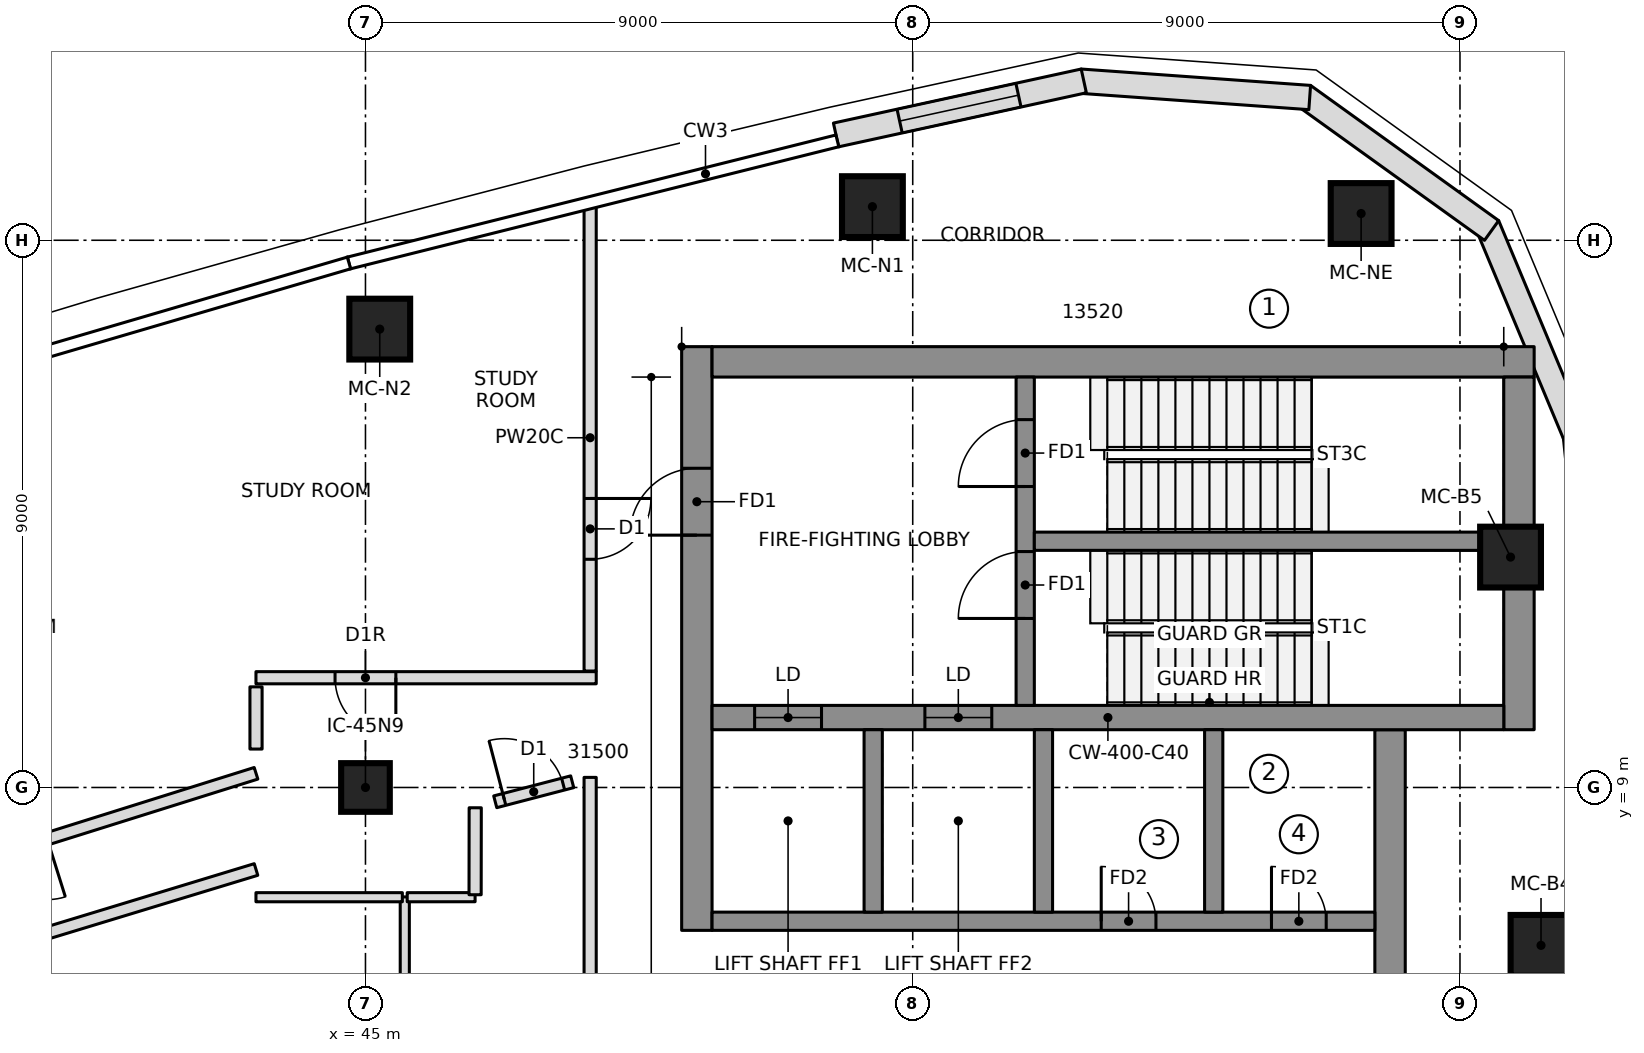
"""IFC4 building model, lengths in metres.
Left out: names, types, materials, properties, quantities, classifications, styles, units other than length and angle.
Written with IfcOpenShell. Run it as: python <this file> out.ifc"""

import sys

from ifc_helpers import new_model, si_unit, direction, frame, frame_2d, origin, origin_2d, place, context, subcontext, project, spatial, polyline, rectangle, outline, extrude, element, fill, save


model = new_model("IFC4")
c1 = context("Model", 3, precision=1e-05, world=origin(), true_north=direction((0.0, 1.0)))
c2 = subcontext(c1, "Body", "Model", "MODEL_VIEW")
j1 = project(units=[si_unit("LENGTHUNIT", "METRE"), si_unit("PLANEANGLEUNIT", "RADIAN")], contexts=[c1])
p1 = place(None, origin())
s1 = spatial("IfcSite", under=j1, at=p1, CompositionType="ELEMENT")
p2 = place(p1, origin())
s2 = spatial("IfcBuilding", under=s1, at=p2, CompositionType="ELEMENT")
p3 = place(p2, frame((0.0, 0.0, 318.6)))
s3 = spatial("IfcBuildingStorey", under=s2, at=p3, CompositionType="ELEMENT", Elevation=318.6)
p4 = place(p3, frame((50.45, 6.65, 0.0), z_axis=(0.0, 0.0, 1.0), x_axis=(0.0, 1.0, 0.0)))
e1 = element("IfcWall", 1, at=p4, inside=s3, PredefinedType="SHEAR", context=c2, shape_type="SweptSolid", body=[
    extrude(rectangle(XDim=9.6, YDim=0.5, at=frame_2d((4.8, 0.0))), origin(), (0.0, 0.0, 1.0), 4.4),
])
p5 = place(p4, frame((6.5, 0.0, 0.0)))
e2 = element("IfcOpeningElement", 2, at=p5, cuts=e1, PredefinedType="OPENING", context=c2, shape_type="SweptSolid", body=[
    extrude(rectangle(XDim=1.1, YDim=2.1, at=frame_2d((0.55, 1.05))), frame((0.0, 0.26, 0.0), z_axis=(0.0, -1.0, 0.0), x_axis=(1.0, 0.0, 0.0)), (0.0, 0.0, 1.0), 0.52),
])
p6 = place(p3, frame((50.7, 16.0, 0.0), z_axis=(0.0, 0.0, 1.0), x_axis=(1.0, 0.0, 0.0)))
e3 = element("IfcWall", 3, at=p6, inside=s3, PredefinedType="SHEAR", context=c2, shape_type="SweptSolid", body=[
    extrude(rectangle(XDim=13.52, YDim=0.5, at=frame_2d((6.76, 0.0))), origin(), (0.0, 0.0, 1.0), 4.4),
])
p7 = place(p3, frame((63.97, 9.95, 0.0), z_axis=(0.0, 0.0, 1.0), x_axis=(0.0, 1.0, 0.0)))
e4 = element("IfcWall", 4, at=p7, inside=s3, PredefinedType="SHEAR", context=c2, shape_type="SweptSolid", body=[
    extrude(rectangle(XDim=5.8, YDim=0.5, at=frame_2d((2.9, 0.0))), origin(), (0.0, 0.0, 1.0), 4.4),
])
p8 = place(p3, frame((61.85, -9.95, 0.0), z_axis=(0.0, 0.0, 1.0), x_axis=(0.0, 1.0, 0.0)))
e5 = element("IfcWall", 5, at=p8, inside=s3, PredefinedType="SHEAR", context=c2, shape_type="SweptSolid", body=[
    extrude(rectangle(XDim=19.9, YDim=0.5, at=frame_2d((9.95, 0.0))), origin(), (0.0, 0.0, 1.0), 4.4),
])
p9 = place(p3, frame((50.7, 10.15, 0.0), z_axis=(0.0, 0.0, 1.0), x_axis=(1.0, 0.0, 0.0)))
e6 = element("IfcWall", 6, at=p9, inside=s3, PredefinedType="SHEAR", context=c2, shape_type="SweptSolid", body=[
    extrude(rectangle(XDim=13.02, YDim=0.4, at=frame_2d((6.51, 0.0))), origin(), (0.0, 0.0, 1.0), 4.4),
])
p10 = place(p9, frame((0.7, 0.0, 0.0)))
e7 = element("IfcOpeningElement", 7, at=p10, cuts=e6, PredefinedType="OPENING", context=c2, shape_type="SweptSolid", body=[
    extrude(rectangle(XDim=1.1, YDim=2.1, at=frame_2d((0.55, 1.05))), frame((0.0, 0.21, 0.0), z_axis=(0.0, -1.0, 0.0), x_axis=(1.0, 0.0, 0.0)), (0.0, 0.0, 1.0), 0.42),
])
p11 = place(p9, frame((3.5, 0.0, 0.0)))
e8 = element("IfcOpeningElement", 8, at=p11, cuts=e6, PredefinedType="OPENING", context=c2, shape_type="SweptSolid", body=[
    extrude(rectangle(XDim=1.1, YDim=2.1, at=frame_2d((0.55, 1.05))), frame((0.0, 0.21, 0.0), z_axis=(0.0, -1.0, 0.0), x_axis=(1.0, 0.0, 0.0)), (0.0, 0.0, 1.0), 0.42),
])
p12 = place(p3, frame((50.7, 6.8, 0.0), z_axis=(0.0, 0.0, 1.0), x_axis=(1.0, 0.0, 0.0)))
e9 = element("IfcWall", 9, at=p12, inside=s3, PredefinedType="SHEAR", context=c2, shape_type="SweptSolid", body=[
    extrude(rectangle(XDim=10.9, YDim=0.3, at=frame_2d((5.45, 0.0))), origin(), (0.0, 0.0, 1.0), 4.4),
])
p13 = place(p12, frame((6.4, 0.0, 0.0)))
e10 = element("IfcOpeningElement", 10, at=p13, cuts=e9, PredefinedType="OPENING", context=c2, shape_type="SweptSolid", body=[
    extrude(rectangle(XDim=0.9, YDim=2.1, at=frame_2d((0.45, 1.05))), frame((0.0, 0.16, 0.0), z_axis=(0.0, -1.0, 0.0), x_axis=(1.0, 0.0, 0.0)), (0.0, 0.0, 1.0), 0.32),
])
p14 = place(p12, frame((9.2, 0.0, 0.0)))
e11 = element("IfcOpeningElement", 11, at=p14, cuts=e9, PredefinedType="OPENING", context=c2, shape_type="SweptSolid", body=[
    extrude(rectangle(XDim=0.9, YDim=2.1, at=frame_2d((0.45, 1.05))), frame((0.0, 0.16, 0.0), z_axis=(0.0, -1.0, 0.0), x_axis=(1.0, 0.0, 0.0)), (0.0, 0.0, 1.0), 0.32),
])
for number, where, z_axis, x_axis in (
    (12, (53.35, 6.95, 0.0), (0.0, 0.0, 1.0), (0.0, 1.0, 0.0)),
    (13, (56.15, 6.95, 0.0), (0.0, 0.0, 1.0), (0.0, 1.0, 0.0)),
    (14, (58.95, 6.95, 0.0), (0.0, 0.0, 1.0), (0.0, 1.0, 0.0)),
):
    element("IfcWall", number, at=place(p3, frame(where, z_axis=z_axis, x_axis=x_axis)), inside=s3, PredefinedType="SHEAR", context=c2, shape_type="SweptSolid", body=[
        extrude(rectangle(XDim=3.0, YDim=0.3, at=frame_2d((1.5, 0.0))), origin(), (0.0, 0.0, 1.0), 4.4),
    ])
p15 = place(p3, frame((55.85, 10.35, 0.0), z_axis=(0.0, 0.0, 1.0), x_axis=(0.0, 1.0, 0.0)))
e15 = element("IfcWall", 15, at=p15, inside=s3, PredefinedType="SHEAR", context=c2, shape_type="SweptSolid", body=[
    extrude(rectangle(XDim=5.4, YDim=0.3, at=frame_2d((2.7, 0.0))), origin(), (0.0, 0.0, 1.0), 4.4),
])
p16 = place(p15, frame((1.43, 0.0, 0.0)))
e16 = element("IfcOpeningElement", 16, at=p16, cuts=e15, PredefinedType="OPENING", context=c2, shape_type="SweptSolid", body=[
    extrude(rectangle(XDim=1.1, YDim=2.1, at=frame_2d((0.55, 1.05))), frame((0.0, 0.16, 0.0), z_axis=(0.0, -1.0, 0.0), x_axis=(1.0, 0.0, 0.0)), (0.0, 0.0, 1.0), 0.32),
])
p17 = place(p15, frame((3.6, 0.0, 0.0)))
e17 = element("IfcOpeningElement", 17, at=p17, cuts=e15, PredefinedType="OPENING", context=c2, shape_type="SweptSolid", body=[
    extrude(rectangle(XDim=1.1, YDim=2.1, at=frame_2d((0.55, 1.05))), frame((0.0, 0.16, 0.0), z_axis=(0.0, -1.0, 0.0), x_axis=(1.0, 0.0, 0.0)), (0.0, 0.0, 1.0), 0.32),
])
p18 = place(p3, frame((56.0, 13.05, 0.0), z_axis=(0.0, 0.0, 1.0), x_axis=(1.0, 0.0, 0.0)))
e18 = element("IfcWall", 18, at=p18, inside=s3, PredefinedType="SHEAR", context=c2, shape_type="SweptSolid", body=[
    extrude(rectangle(XDim=7.72, YDim=0.3, at=frame_2d((3.86, 0.0))), origin(), (0.0, 0.0, 1.0), 4.4),
])
for number, where, z_axis, x_axis in (
    (19, (64.333, 6.403, 0.0), (0.0, 0.0, 1.0), (1.0, 0.0, 0.0)),
    (20, (63.832, 12.789, 0.0), (0.0, 0.0, 1.0), (1.0, 0.0, 0.0)),
    (21, (61.374, 18.44, 0.0), (0.0, 0.0, 1.0), (1.0, 0.0, 0.0)),
    (22, (53.337, 18.553, 0.0), (0.0, 0.0, 1.0), (1.0, 0.0, 0.0)),
    (23, (45.235, 16.539, 0.0), (0.0, 0.0, 1.0), (1.0, 0.0, 0.0)),
):
    element("IfcColumn", number, at=place(p3, frame(where, z_axis=z_axis, x_axis=x_axis)), inside=s3, PredefinedType="COLUMN", context=c2, shape_type="SweptSolid", body=[
        extrude(rectangle(XDim=1.0, YDim=1.0, at=origin_2d()), origin(), (0.0, 0.0, 1.0), 4.4),
    ])
p19 = place(p3, frame((45.0, 9.0, 0.0), z_axis=(0.0, 0.0, 1.0), x_axis=(1.0, 0.0, 0.0)))
e24 = element("IfcColumn", 24, at=p19, inside=s3, PredefinedType="COLUMN", context=c2, shape_type="SweptSolid", body=[
    extrude(rectangle(XDim=0.8, YDim=0.8, at=origin_2d()), origin(), (0.0, 0.0, 1.0), 4.4),
])
p20 = place(p3, frame((65.331, 10.571, 0.0), z_axis=(0.0, 0.0, 1.0), x_axis=(-0.102249826987, 0.994758751096, 0.0)))
e25 = element("IfcWall", 25, at=p20, inside=s3, PredefinedType="NOTDEFINED", context=c2, shape_type="SweptSolid", body=[
    extrude(outline(polyline([(-0.003, -0.2), (4.263, -0.2), (4.204, 0.2), (0.003, 0.2), (-0.003, -0.2)])), origin(), (0.0, 0.0, 1.0), 4.1),
])
p21 = place(p20, frame((0.617, 0.0, 0.5)))
e26 = element("IfcOpeningElement", 26, at=p21, cuts=e25, PredefinedType="OPENING", context=c2, shape_type="SweptSolid", body=[
    extrude(rectangle(XDim=2.0, YDim=2.4, at=frame_2d((1.0, 1.2))), frame((0.0, 0.21, 0.0), z_axis=(0.0, -1.0, 0.0), x_axis=(1.0, 0.0, 0.0)), (0.0, 0.0, 1.0), 0.42),
])
p22 = place(p3, frame((64.898, 14.782, 0.0), z_axis=(0.0, 0.0, 1.0), x_axis=(-0.385285857918, 0.922797273343, 0.0)))
e27 = element("IfcWall", 27, at=p22, inside=s3, PredefinedType="NOTDEFINED", context=c2, shape_type="SweptSolid", body=[
    extrude(outline(polyline([(-0.03, -0.2), (3.753, -0.2), (3.64, 0.2), (0.03, 0.2), (-0.03, -0.2)])), origin(), (0.0, 0.0, 1.0), 4.1),
])
p23 = place(p3, frame((63.474, 18.194, 0.0), z_axis=(0.0, 0.0, 1.0), x_axis=(-0.811962548682, 0.583709533533, 0.0)))
e28 = element("IfcWall", 28, at=p23, inside=s3, PredefinedType="NOTDEFINED", context=c2, shape_type="SweptSolid", body=[
    extrude(outline(polyline([(-0.057, -0.2), (3.753, -0.2), (3.64, 0.2), (0.057, 0.2), (-0.057, -0.2)])), origin(), (0.0, 0.0, 1.0), 4.1),
])
p24 = place(p3, frame((60.472, 20.352, 0.0), z_axis=(0.0, 0.0, 1.0), x_axis=(-0.99746272096, 0.071190731806, 0.0)))
e29 = element("IfcWall", 29, at=p24, inside=s3, PredefinedType="NOTDEFINED", context=c2, shape_type="SweptSolid", body=[
    extrude(outline(polyline([(-0.057, -0.2), (3.726, -0.2), (3.668, 0.2), (0.057, 0.2), (-0.057, -0.2)])), origin(), (0.0, 0.0, 1.0), 4.1),
])
p25 = place(p3, frame((56.785, 20.615, 0.0), z_axis=(0.0, 0.0, 1.0), x_axis=(-0.977020225348, -0.213146614471, 0.0)))
e30 = element("IfcWall", 30, at=p25, inside=s3, PredefinedType="NOTDEFINED", context=c2, shape_type="SweptSolid", body=[
    extrude(outline(polyline([(-0.029, -0.2), (4.142, -0.2), (4.142, 0.2), (0.029, 0.2), (-0.029, -0.2)])), origin(), (0.0, 0.0, 1.0), 4.1),
])
p26 = place(p25, frame((1.071, 0.0, 0.5)))
e31 = element("IfcOpeningElement", 31, at=p26, cuts=e30, PredefinedType="OPENING", context=c2, shape_type="SweptSolid", body=[
    extrude(rectangle(XDim=2.0, YDim=2.4, at=frame_2d((1.0, 1.2))), frame((0.0, 0.21, 0.0), z_axis=(0.0, -1.0, 0.0), x_axis=(1.0, 0.0, 0.0)), (0.0, 0.0, 1.0), 0.42),
])
p27 = place(p3, frame((43.2, 9.233, 0.0), z_axis=(0.0, 0.0, 1.0), x_axis=(-0.954140318271, -0.299359738524, 0.0)))
e32 = element("IfcWall", 32, at=p27, inside=s3, PredefinedType="PARTITIONING", context=c2, shape_type="SweptSolid", body=[
    extrude(rectangle(XDim=8.2, YDim=0.2, at=frame_2d((4.1, 0.0))), origin(), (0.0, 0.0, 1.0), 4.0),
])
p28 = place(p27, frame((3.6, 0.0, 0.0)))
e33 = element("IfcOpeningElement", 33, at=p28, cuts=e32, PredefinedType="OPENING", context=c2, shape_type="SweptSolid", body=[
    extrude(rectangle(XDim=1.0, YDim=2.1, at=frame_2d((0.5, 1.05))), frame((0.0, 0.11, 0.0), z_axis=(0.0, -1.0, 0.0), x_axis=(1.0, 0.0, 0.0)), (0.0, 0.0, 1.0), 0.22),
])
p29 = place(p3, frame((39.544, 6.539, 0.0), z_axis=(0.0, 0.0, 1.0), x_axis=(0.956743485636, 0.290932814743, 0.0)))
e34 = element("IfcWall", 34, at=p29, inside=s3, PredefinedType="PARTITIONING", context=c2, shape_type="SweptSolid", body=[
    extrude(rectangle(XDim=3.822, YDim=0.2, at=frame_2d((1.911, 0.0))), origin(), (0.0, 0.0, 1.0), 4.0),
])
p30 = place(p3, frame((45.646, -7.2, 0.0), z_axis=(0.0, 0.0, 1.0), x_axis=(0.0, 1.0, 0.0)))
e35 = element("IfcWall", 35, at=p30, inside=s3, PredefinedType="PARTITIONING", context=c2, shape_type="SweptSolid", body=[
    extrude(rectangle(XDim=14.4, YDim=0.15, at=frame_2d((7.2, 0.0))), origin(), (0.0, 0.0, 1.0), 4.0),
])
p31 = place(p3, frame((48.795, 10.805, 0.0), z_axis=(0.0, 0.0, 1.0), x_axis=(-0.999999999048, -4.3628114e-05, 0.0)))
e36 = element("IfcWall", 36, at=p31, inside=s3, PredefinedType="PARTITIONING", context=c2, shape_type="SweptSolid", body=[
    extrude(rectangle(XDim=5.596, YDim=0.2, at=frame_2d((2.798, 0.0))), origin(), (0.0, 0.0, 1.0), 4.0),
])
p32 = place(p31, frame((3.295, 0.0, 0.0)))
e37 = element("IfcOpeningElement", 37, at=p32, cuts=e36, PredefinedType="OPENING", context=c2, shape_type="SweptSolid", body=[
    extrude(rectangle(XDim=1.0, YDim=2.1, at=frame_2d((0.5, 1.05))), frame((0.0, 0.11, 0.0), z_axis=(0.0, -1.0, 0.0), x_axis=(1.0, 0.0, 0.0)), (0.0, 0.0, 1.0), 0.22),
])
p33 = place(p3, frame((47.134, 8.764, 0.0), z_axis=(0.0, 0.0, 1.0), x_axis=(0.967678694968, 0.252186326563, 0.0)))
e38 = element("IfcWall", 38, at=p33, inside=s3, PredefinedType="PARTITIONING", context=c2, shape_type="SweptSolid", body=[
    extrude(rectangle(XDim=1.308, YDim=0.2, at=frame_2d((0.654, 0.0))), origin(), (0.0, 0.0, 1.0), 4.0),
])
p34 = place(p33, frame((0.154, 0.0, 0.0)))
e39 = element("IfcOpeningElement", 39, at=p34, cuts=e38, PredefinedType="OPENING", context=c2, shape_type="SweptSolid", body=[
    extrude(rectangle(XDim=1.0, YDim=2.1, at=frame_2d((0.5, 1.05))), frame((0.0, 0.11, 0.0), z_axis=(0.0, -1.0, 0.0), x_axis=(1.0, 0.0, 0.0)), (0.0, 0.0, 1.0), 0.22),
])
p35 = place(p3, frame((48.695, 18.589, 0.0), z_axis=(0.0, 0.0, 1.0), x_axis=(0.0, -1.0, 0.0)))
e40 = element("IfcWall", 40, at=p35, inside=s3, PredefinedType="PARTITIONING", context=c2, shape_type="SweptSolid", body=[
    extrude(rectangle(XDim=7.674, YDim=0.2, at=frame_2d((3.837, 0.0))), origin(), (0.0, 0.0, 1.0), 4.0),
])
p36 = place(p35, frame((4.836, 0.0, 0.0)))
e41 = element("IfcOpeningElement", 41, at=p36, cuts=e40, PredefinedType="OPENING", context=c2, shape_type="SweptSolid", body=[
    extrude(rectangle(XDim=1.0, YDim=2.1, at=frame_2d((0.5, 1.05))), frame((0.0, 0.11, 0.0), z_axis=(0.0, -1.0, 0.0), x_axis=(1.0, 0.0, 0.0)), (0.0, 0.0, 1.0), 0.22),
])
p37 = place(p3, frame((43.199, 7.195, 0.0), z_axis=(0.0, 0.0, 1.0), x_axis=(1.0, 0.0, 0.0)))
e42 = element("IfcWall", 42, at=p37, inside=s3, PredefinedType="PARTITIONING", context=c2, shape_type="SweptSolid", body=[
    extrude(rectangle(XDim=2.407, YDim=0.15, at=frame_2d((1.204, 0.0))), origin(), (0.0, 0.0, 1.0), 4.0),
])
p38 = place(p3, frame((45.687, 7.195, 0.0), z_axis=(0.0, 0.0, 1.0), x_axis=(0.999999784722, 0.000656167838, 0.0)))
e43 = element("IfcWall", 43, at=p38, inside=s3, PredefinedType="PARTITIONING", context=c2, shape_type="SweptSolid", body=[
    extrude(rectangle(XDim=1.116, YDim=0.15, at=frame_2d((0.558, 0.0))), origin(), (0.0, 0.0, 1.0), 4.0),
])
p39 = place(p3, frame((46.803, 7.236, 0.0), z_axis=(0.0, 0.0, 1.0), x_axis=(0.001365419447, 0.999999067814, 0.0)))
e44 = element("IfcWall", 44, at=p39, inside=s3, PredefinedType="PARTITIONING", context=c2, shape_type="SweptSolid", body=[
    extrude(rectangle(XDim=1.43, YDim=0.2, at=frame_2d((0.715, 0.0))), origin(), (0.0, 0.0, 1.0), 4.0),
])
p40 = place(p3, frame((48.695, 9.166, 0.0), z_axis=(0.0, 0.0, 1.0), x_axis=(0.0, -1.0, 0.0)))
e45 = element("IfcWall", 45, at=p40, inside=s3, PredefinedType="PARTITIONING", context=c2, shape_type="SweptSolid", body=[
    extrude(rectangle(XDim=18.332, YDim=0.2, at=frame_2d((9.166, 0.0))), origin(), (0.0, 0.0, 1.0), 4.0),
])
p41 = place(p3, frame((43.2, 9.632, 0.0), z_axis=(0.0, 0.0, 1.0), x_axis=(0.0, 1.0, 0.0)))
e46 = element("IfcWall", 46, at=p41, inside=s3, PredefinedType="PARTITIONING", context=c2, shape_type="SweptSolid", body=[
    extrude(rectangle(XDim=1.023, YDim=0.2, at=frame_2d((0.511, 0.0))), origin(), (0.0, 0.0, 1.0), 4.0),
])
p42 = place(p26, origin())
e47 = element("IfcWindow", 47, at=p42, inside=s3, PartitioningType="SINGLE_PANEL", PredefinedType="WINDOW", context=c2, shape_type="SweptSolid", body=[
    extrude(rectangle(XDim=2.0, YDim=2.4, at=frame_2d((1.0, 1.2))), frame((0.0, 0.17, 0.0), z_axis=(0.0, -1.0, 0.0), x_axis=(1.0, 0.0, 0.0)), (0.0, 0.0, 1.0), 0.06),
])
fill(e31, e47)
p43 = place(p34, origin())
e48 = element("IfcDoor", 48, at=p43, inside=s3, OperationType="SINGLE_SWING_LEFT", PredefinedType="DOOR", context=c2, shape_type="SweptSolid", body=[
    extrude(rectangle(XDim=1.0, YDim=2.1, at=frame_2d((0.5, 1.05))), frame((0.0, 0.025, 0.0), z_axis=(0.0, -1.0, 0.0), x_axis=(1.0, 0.0, 0.0)), (0.0, 0.0, 1.0), 0.05),
])
fill(e39, e48)
p44 = place(p32, origin())
e49 = element("IfcDoor", 49, at=p44, inside=s3, OperationType="SINGLE_SWING_RIGHT", PredefinedType="DOOR", context=c2, shape_type="SweptSolid", body=[
    extrude(rectangle(XDim=1.0, YDim=2.1, at=frame_2d((0.5, 1.05))), frame((0.0, 0.025, 0.0), z_axis=(0.0, -1.0, 0.0), x_axis=(1.0, 0.0, 0.0)), (0.0, 0.0, 1.0), 0.05),
])
fill(e37, e49)
p45 = place(p36, origin())
e50 = element("IfcDoor", 50, at=p45, inside=s3, OperationType="SINGLE_SWING_LEFT", PredefinedType="DOOR", context=c2, shape_type="SweptSolid", body=[
    extrude(rectangle(XDim=1.0, YDim=2.1, at=frame_2d((0.5, 1.05))), frame((0.0, 0.025, 0.0), z_axis=(0.0, -1.0, 0.0), x_axis=(1.0, 0.0, 0.0)), (0.0, 0.0, 1.0), 0.05),
])
fill(e41, e50)
p46 = place(p10, origin())
e51 = element("IfcDoor", 51, at=p46, inside=s3, OperationType="DOUBLE_DOOR_SLIDING", PredefinedType="DOOR", context=c2, shape_type="SweptSolid", body=[
    extrude(rectangle(XDim=1.1, YDim=2.1, at=frame_2d((0.55, 1.05))), frame((0.0, 0.025, 0.0), z_axis=(0.0, -1.0, 0.0), x_axis=(1.0, 0.0, 0.0)), (0.0, 0.0, 1.0), 0.05),
])
fill(e7, e51)
p47 = place(p11, origin())
e52 = element("IfcDoor", 52, at=p47, inside=s3, OperationType="DOUBLE_DOOR_SLIDING", PredefinedType="DOOR", context=c2, shape_type="SweptSolid", body=[
    extrude(rectangle(XDim=1.1, YDim=2.1, at=frame_2d((0.55, 1.05))), frame((0.0, 0.025, 0.0), z_axis=(0.0, -1.0, 0.0), x_axis=(1.0, 0.0, 0.0)), (0.0, 0.0, 1.0), 0.05),
])
fill(e8, e52)
p48 = place(p16, origin())
e53 = element("IfcDoor", 53, at=p48, inside=s3, OperationType="SINGLE_SWING_RIGHT", PredefinedType="DOOR", context=c2, shape_type="SweptSolid", body=[
    extrude(rectangle(XDim=1.1, YDim=2.1, at=frame_2d((0.55, 1.05))), frame((0.0, 0.025, 0.0), z_axis=(0.0, -1.0, 0.0), x_axis=(1.0, 0.0, 0.0)), (0.0, 0.0, 1.0), 0.05),
])
fill(e16, e53)
p49 = place(p17, origin())
e54 = element("IfcDoor", 54, at=p49, inside=s3, OperationType="SINGLE_SWING_RIGHT", PredefinedType="DOOR", context=c2, shape_type="SweptSolid", body=[
    extrude(rectangle(XDim=1.1, YDim=2.1, at=frame_2d((0.55, 1.05))), frame((0.0, 0.025, 0.0), z_axis=(0.0, -1.0, 0.0), x_axis=(1.0, 0.0, 0.0)), (0.0, 0.0, 1.0), 0.05),
])
fill(e17, e54)
p50 = place(p5, origin())
e55 = element("IfcDoor", 55, at=p50, inside=s3, OperationType="SINGLE_SWING_RIGHT", PredefinedType="DOOR", context=c2, shape_type="SweptSolid", body=[
    extrude(rectangle(XDim=1.1, YDim=2.1, at=frame_2d((0.55, 1.05))), frame((0.0, 0.025, 0.0), z_axis=(0.0, -1.0, 0.0), x_axis=(1.0, 0.0, 0.0)), (0.0, 0.0, 1.0), 0.05),
])
fill(e2, e55)
p51 = place(p13, origin())
e56 = element("IfcDoor", 56, at=p51, inside=s3, OperationType="SINGLE_SWING_LEFT", PredefinedType="DOOR", context=c2, shape_type="SweptSolid", body=[
    extrude(rectangle(XDim=0.9, YDim=2.1, at=frame_2d((0.45, 1.05))), frame((0.0, 0.025, 0.0), z_axis=(0.0, -1.0, 0.0), x_axis=(1.0, 0.0, 0.0)), (0.0, 0.0, 1.0), 0.05),
])
fill(e10, e56)
p52 = place(p14, origin())
e57 = element("IfcDoor", 57, at=p52, inside=s3, OperationType="SINGLE_SWING_LEFT", PredefinedType="DOOR", context=c2, shape_type="SweptSolid", body=[
    extrude(rectangle(XDim=0.9, YDim=2.1, at=frame_2d((0.45, 1.05))), frame((0.0, 0.025, 0.0), z_axis=(0.0, -1.0, 0.0), x_axis=(1.0, 0.0, 0.0)), (0.0, 0.0, 1.0), 0.05),
])
fill(e11, e57)
save(model, sys.argv[1])
